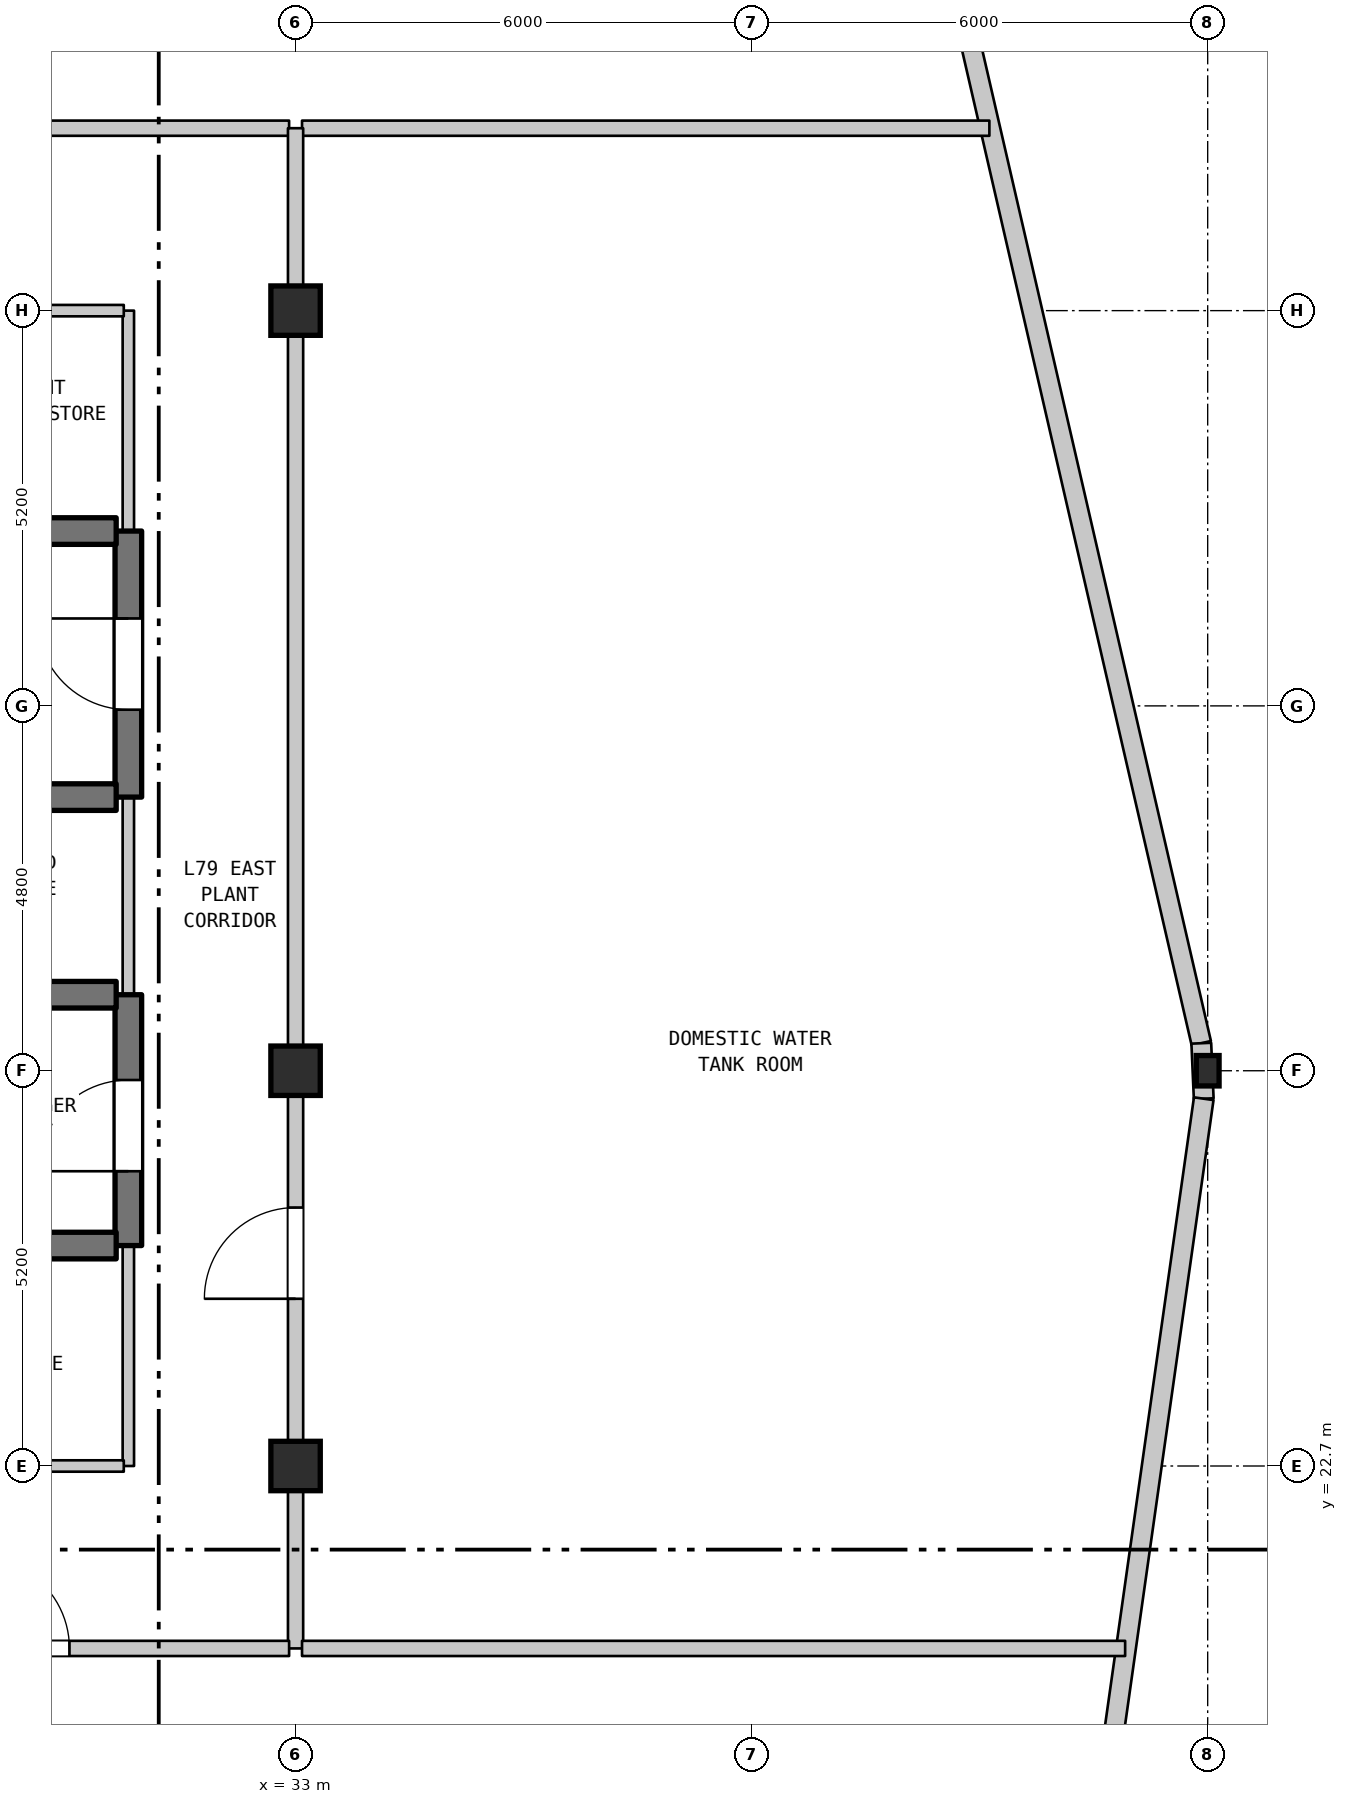
"""IFC4 building model, lengths in metres.
Left out: names, types, materials, properties, quantities, classifications, styles, units other than length and angle.
Written with IfcOpenShell. Run it as: python <this file> out.ifc"""

import sys

from ifc_helpers import new_model, si_unit, direction, frame, frame_2d, origin, origin_2d, place, context, subcontext, project, spatial, rectangle, i_section, extrude, element, fill, save


model = new_model("IFC4")
c1 = context("Model", 3, precision=1e-05, world=origin(), true_north=direction((0.0, 1.0)))
c2 = subcontext(c1, "Body", "Model", "MODEL_VIEW")
j1 = project(units=[si_unit("LENGTHUNIT", "METRE"), si_unit("PLANEANGLEUNIT", "RADIAN")], contexts=[c1])
p1 = place(None, origin())
s1 = spatial("IfcSite", under=j1, at=p1, CompositionType="ELEMENT")
p2 = place(p1, origin())
s2 = spatial("IfcBuilding", under=s1, at=p2, CompositionType="ELEMENT")
p3 = place(p2, frame((0.0, 0.0, 314.7)))
s3 = spatial("IfcBuildingStorey", under=s2, at=p3, CompositionType="ELEMENT", Elevation=314.7)
for number, where, z_axis, x_axis in (
    (1, (33.0, 22.7, 0.0), (0.0, 0.0, 1.0), (1.0, 0.0, 0.0)),
    (2, (33.0, 27.9, 0.0), (0.0, 0.0, 1.0), (1.0, 0.0, 0.0)),
    (3, (33.0, 37.9, 0.0), (0.0, 0.0, 1.0), (1.0, 0.0, 0.0)),
):
    element("IfcColumn", number, at=place(p3, frame(where, z_axis=z_axis, x_axis=x_axis)), inside=s3, PredefinedType="COLUMN", context=c2, shape_type="SweptSolid", body=[
        extrude(rectangle(XDim=0.65, YDim=0.65, at=origin_2d()), origin(), (0.0, 0.0, 1.0), 5.3),
    ])
p4 = place(p3, frame((45.0, 27.9, 0.0), z_axis=(0.0, 0.0, 1.0), x_axis=(1.0, 0.0, 0.0)))
e4 = element("IfcColumn", 4, at=p4, inside=s3, PredefinedType="COLUMN", context=c2, shape_type="SweptSolid", body=[
    extrude(i_section(OverallWidth=0.3, OverallDepth=0.4, WebThickness=0.013, FlangeThickness=0.024, FilletRadius=0.027, at=origin_2d()), origin(), (0.0, 0.0, 1.0), 5.3),
])
p5 = place(p3, frame((39.358, 52.35, 0.0), z_axis=(0.0, 0.0, 1.0), x_axis=(0.224832819719, -0.974397353843, 0.0)))
e5 = element("IfcWall", 5, at=p5, inside=s3, PredefinedType="STANDARD", context=c2, shape_type="SweptSolid", body=[
    extrude(rectangle(XDim=24.721, YDim=0.26, at=frame_2d((12.36, 0.0))), origin(), (0.0, 0.0, 1.0), 4.99),
])
p6 = place(p3, frame((44.916, 28.262, 0.0), z_axis=(0.0, 0.0, 1.0), x_axis=(0.043770719053, -0.999041602814, 0.0)))
e6 = element("IfcWall", 6, at=p6, inside=s3, PredefinedType="STANDARD", context=c2, shape_type="SweptSolid", body=[
    extrude(rectangle(XDim=0.731, YDim=0.26, at=frame_2d((0.365, 0.0))), origin(), (0.0, 0.0, 1.0), 4.99),
])
p7 = place(p3, frame((44.948, 27.532, 0.0), z_axis=(0.0, 0.0, 1.0), x_axis=(-0.140140996848, -0.990131557422, 0.0)))
e7 = element("IfcWall", 7, at=p7, inside=s3, PredefinedType="STANDARD", context=c2, shape_type="SweptSolid", body=[
    extrude(rectangle(XDim=19.302, YDim=0.26, at=frame_2d((9.651, 0.0))), origin(), (0.0, 0.0, 1.0), 4.99),
])
p8 = place(p3, frame((30.8, 22.7, 0.0), z_axis=(0.0, 0.0, 1.0), x_axis=(0.0, 1.0, 0.0)))
e8 = element("IfcWall", 8, at=p8, inside=s3, PredefinedType="STANDARD", context=c2, shape_type="SweptSolid", body=[
    extrude(rectangle(XDim=2.9, YDim=0.15, at=frame_2d((1.45, 0.0))), origin(), (0.0, 0.0, 1.0), 4.99),
])
p9 = place(p3, frame((30.8, 25.6, 0.0), z_axis=(0.0, 0.0, 1.0), x_axis=(0.0, 1.0, 0.0)))
e9 = element("IfcWall", 9, at=p9, inside=s3, PredefinedType="SHEAR", context=c2, shape_type="SweptSolid", body=[
    extrude(rectangle(XDim=3.3, YDim=0.35, at=frame_2d((1.65, 0.0))), origin(), (0.0, 0.0, 1.0), 4.99),
])
p10 = place(p9, frame((0.978, 0.0, 0.0)))
e10 = element("IfcOpeningElement", 10, at=p10, cuts=e9, PredefinedType="OPENING", context=c2, shape_type="SweptSolid", body=[
    extrude(rectangle(XDim=1.2, YDim=2.2, at=frame_2d((0.6, 1.1))), frame((0.0, 0.185, 0.0), z_axis=(0.0, -1.0, 0.0), x_axis=(1.0, 0.0, 0.0)), (0.0, 0.0, 1.0), 0.37),
])
p11 = place(p3, frame((30.8, 28.9, 0.0), z_axis=(0.0, 0.0, 1.0), x_axis=(0.0, 1.0, 0.0)))
e11 = element("IfcWall", 11, at=p11, inside=s3, PredefinedType="STANDARD", context=c2, shape_type="SweptSolid", body=[
    extrude(rectangle(XDim=2.6, YDim=0.15, at=frame_2d((1.3, 0.0))), origin(), (0.0, 0.0, 1.0), 4.99),
])
p12 = place(p3, frame((30.8, 31.5, 0.0), z_axis=(0.0, 0.0, 1.0), x_axis=(0.0, 1.0, 0.0)))
e12 = element("IfcWall", 12, at=p12, inside=s3, PredefinedType="SHEAR", context=c2, shape_type="SweptSolid", body=[
    extrude(rectangle(XDim=3.5, YDim=0.35, at=frame_2d((1.75, 0.0))), origin(), (0.0, 0.0, 1.0), 4.99),
])
p13 = place(p12, frame((1.15, 0.0, 0.0)))
e13 = element("IfcOpeningElement", 13, at=p13, cuts=e12, PredefinedType="OPENING", context=c2, shape_type="SweptSolid", body=[
    extrude(rectangle(XDim=1.2, YDim=2.2, at=frame_2d((0.6, 1.1))), frame((0.0, 0.185, 0.0), z_axis=(0.0, -1.0, 0.0), x_axis=(1.0, 0.0, 0.0)), (0.0, 0.0, 1.0), 0.37),
])
p14 = place(p3, frame((30.8, 35.0, 0.0), z_axis=(0.0, 0.0, 1.0), x_axis=(0.0, 1.0, 0.0)))
e14 = element("IfcWall", 14, at=p14, inside=s3, PredefinedType="STANDARD", context=c2, shape_type="SweptSolid", body=[
    extrude(rectangle(XDim=2.9, YDim=0.15, at=frame_2d((1.45, 0.0))), origin(), (0.0, 0.0, 1.0), 4.99),
])
p15 = place(p3, frame((33.0, 20.3, 0.0), z_axis=(0.0, 0.0, 1.0), x_axis=(0.0, 1.0, 0.0)))
e15 = element("IfcWall", 15, at=p15, inside=s3, PredefinedType="STANDARD", context=c2, shape_type="SweptSolid", body=[
    extrude(rectangle(XDim=7.6, YDim=0.2, at=frame_2d((3.8, 0.0))), origin(), (0.0, 0.0, 1.0), 4.7),
])
p16 = place(p15, frame((4.6, 0.0, 0.0)))
e16 = element("IfcOpeningElement", 16, at=p16, cuts=e15, PredefinedType="OPENING", context=c2, shape_type="SweptSolid", body=[
    extrude(rectangle(XDim=1.2, YDim=2.2, at=frame_2d((0.6, 1.1))), frame((0.0, 0.11, 0.0), z_axis=(0.0, -1.0, 0.0), x_axis=(1.0, 0.0, 0.0)), (0.0, 0.0, 1.0), 0.22),
])
p17 = place(p3, frame((12.685, 20.3, 0.0), z_axis=(0.0, 0.0, 1.0), x_axis=(1.0, 0.0, 0.0)))
e17 = element("IfcWall", 17, at=p17, inside=s3, PredefinedType="STANDARD", context=c2, shape_type="SweptSolid", body=[
    extrude(rectangle(XDim=20.23, YDim=0.2, at=frame_2d((10.115, 0.0))), origin(), (0.0, 0.0, 1.0), 4.99),
])
p18 = place(p17, frame((6.715, 0.0, 0.0)))
e18 = element("IfcOpeningElement", 18, at=p18, cuts=e17, PredefinedType="OPENING", context=c2, shape_type="SweptSolid", body=[
    extrude(rectangle(XDim=1.2, YDim=2.2, at=frame_2d((0.6, 1.1))), frame((0.0, 0.11, 0.0), z_axis=(0.0, -1.0, 0.0), x_axis=(1.0, 0.0, 0.0)), (0.0, 0.0, 1.0), 0.22),
])
p19 = place(p17, frame((16.14, 0.0, 0.0)))
e19 = element("IfcOpeningElement", 19, at=p19, cuts=e17, PredefinedType="OPENING", context=c2, shape_type="SweptSolid", body=[
    extrude(rectangle(XDim=1.2, YDim=2.2, at=frame_2d((0.6, 1.1))), frame((0.0, 0.11, 0.0), z_axis=(0.0, -1.0, 0.0), x_axis=(1.0, 0.0, 0.0)), (0.0, 0.0, 1.0), 0.22),
])
p20 = place(p3, frame((33.085, 20.3, 0.0), z_axis=(0.0, 0.0, 1.0), x_axis=(1.0, 0.0, 0.0)))
e20 = element("IfcWall", 20, at=p20, inside=s3, PredefinedType="STANDARD", context=c2, shape_type="SweptSolid", body=[
    extrude(rectangle(XDim=10.829, YDim=0.2, at=frame_2d((5.415, 0.0))), origin(), (0.0, 0.0, 1.0), 4.99),
])
p21 = place(p3, frame((27.46, 22.7, 0.0), z_axis=(0.0, 0.0, 1.0), x_axis=(1.0, 0.0, 0.0)))
e21 = element("IfcWall", 21, at=p21, inside=s3, PredefinedType="STANDARD", context=c2, shape_type="SweptSolid", body=[
    extrude(rectangle(XDim=3.28, YDim=0.15, at=frame_2d((1.64, 0.0))), origin(), (0.0, 0.0, 1.0), 4.99),
])
p22 = place(p3, frame((27.46, 25.6, 0.0), z_axis=(0.0, 0.0, 1.0), x_axis=(1.0, 0.0, 0.0)))
e22 = element("IfcWall", 22, at=p22, inside=s3, PredefinedType="SHEAR", context=c2, shape_type="SweptSolid", body=[
    extrude(rectangle(XDim=3.18, YDim=0.35, at=frame_2d((1.59, 0.0))), origin(), (0.0, 0.0, 1.0), 4.99),
])
p23 = place(p22, frame((1.115, 0.0, 0.0)))
e23 = element("IfcOpeningElement", 23, at=p23, cuts=e22, PredefinedType="OPENING", context=c2, shape_type="SweptSolid", body=[
    extrude(rectangle(XDim=0.95, YDim=2.15, at=frame_2d((0.475, 1.075))), frame((0.0, 0.185, 0.0), z_axis=(0.0, -1.0, 0.0), x_axis=(1.0, 0.0, 0.0)), (0.0, 0.0, 1.0), 0.37),
])
p24 = place(p3, frame((27.46, 28.9, 0.0), z_axis=(0.0, 0.0, 1.0), x_axis=(1.0, 0.0, 0.0)))
e24 = element("IfcWall", 24, at=p24, inside=s3, PredefinedType="SHEAR", context=c2, shape_type="SweptSolid", body=[
    extrude(rectangle(XDim=3.18, YDim=0.35, at=frame_2d((1.59, 0.0))), origin(), (0.0, 0.0, 1.0), 4.99),
])
p25 = place(p24, frame((1.115, 0.0, 0.0)))
e25 = element("IfcOpeningElement", 25, at=p25, cuts=e24, PredefinedType="OPENING", context=c2, shape_type="SweptSolid", body=[
    extrude(rectangle(XDim=0.95, YDim=2.15, at=frame_2d((0.475, 1.075))), frame((0.0, 0.185, 0.0), z_axis=(0.0, -1.0, 0.0), x_axis=(1.0, 0.0, 0.0)), (0.0, 0.0, 1.0), 0.37),
])
p26 = place(p3, frame((27.46, 31.5, 0.0), z_axis=(0.0, 0.0, 1.0), x_axis=(1.0, 0.0, 0.0)))
e26 = element("IfcWall", 26, at=p26, inside=s3, PredefinedType="SHEAR", context=c2, shape_type="SweptSolid", body=[
    extrude(rectangle(XDim=3.18, YDim=0.35, at=frame_2d((1.59, 0.0))), origin(), (0.0, 0.0, 1.0), 4.99),
])
p27 = place(p3, frame((26.645, 35.0, 0.0), z_axis=(0.0, 0.0, 1.0), x_axis=(1.0, 0.0, 0.0)))
e27 = element("IfcWall", 27, at=p27, inside=s3, PredefinedType="SHEAR", context=c2, shape_type="SweptSolid", body=[
    extrude(rectangle(XDim=3.995, YDim=0.35, at=frame_2d((1.998, 0.0))), origin(), (0.0, 0.0, 1.0), 4.99),
])
p28 = place(p27, frame((1.508, 0.0, 0.0)))
e28 = element("IfcOpeningElement", 28, at=p28, cuts=e27, PredefinedType="OPENING", context=c2, shape_type="SweptSolid", body=[
    extrude(rectangle(XDim=0.95, YDim=2.15, at=frame_2d((0.475, 1.075))), frame((0.0, 0.185, 0.0), z_axis=(0.0, -1.0, 0.0), x_axis=(1.0, 0.0, 0.0)), (0.0, 0.0, 1.0), 0.37),
])
p29 = place(p3, frame((26.645, 37.9, 0.0), z_axis=(0.0, 0.0, 1.0), x_axis=(1.0, 0.0, 0.0)))
e29 = element("IfcWall", 29, at=p29, inside=s3, PredefinedType="STANDARD", context=c2, shape_type="SweptSolid", body=[
    extrude(rectangle(XDim=4.095, YDim=0.15, at=frame_2d((2.047, 0.0))), origin(), (0.0, 0.0, 1.0), 4.49),
])
p30 = place(p3, frame((12.685, 40.3, 0.0), z_axis=(0.0, 0.0, 1.0), x_axis=(1.0, 0.0, 0.0)))
e30 = element("IfcWall", 30, at=p30, inside=s3, PredefinedType="STANDARD", context=c2, shape_type="SweptSolid", body=[
    extrude(rectangle(XDim=20.23, YDim=0.2, at=frame_2d((10.115, 0.0))), origin(), (0.0, 0.0, 1.0), 4.99),
])
p31 = place(p30, frame((12.14, 0.0, 0.0)))
e31 = element("IfcOpeningElement", 31, at=p31, cuts=e30, PredefinedType="OPENING", context=c2, shape_type="SweptSolid", body=[
    extrude(rectangle(XDim=1.2, YDim=2.2, at=frame_2d((0.6, 1.1))), frame((0.0, 0.11, 0.0), z_axis=(0.0, -1.0, 0.0), x_axis=(1.0, 0.0, 0.0)), (0.0, 0.0, 1.0), 0.22),
])
p32 = place(p3, frame((33.085, 40.3, 0.0), z_axis=(0.0, 0.0, 1.0), x_axis=(1.0, 0.0, 0.0)))
e32 = element("IfcWall", 32, at=p32, inside=s3, PredefinedType="STANDARD", context=c2, shape_type="SweptSolid", body=[
    extrude(rectangle(XDim=9.043, YDim=0.2, at=frame_2d((4.521, 0.0))), origin(), (0.0, 0.0, 1.0), 4.99),
])
p33 = place(p3, frame((33.0, 27.9, 0.0), z_axis=(0.0, 0.0, 1.0), x_axis=(0.0, 1.0, 0.0)))
e33 = element("IfcWall", 33, at=p33, inside=s3, PredefinedType="STANDARD", context=c2, shape_type="SweptSolid", body=[
    extrude(rectangle(XDim=10.0, YDim=0.2, at=frame_2d((5.0, 0.0))), origin(), (0.0, 0.0, 1.0), 4.49),
])
p34 = place(p3, frame((33.0, 37.9, 0.0), z_axis=(0.0, 0.0, 1.0), x_axis=(0.0, 1.0, 0.0)))
e34 = element("IfcWall", 34, at=p34, inside=s3, PredefinedType="STANDARD", context=c2, shape_type="SweptSolid", body=[
    extrude(rectangle(XDim=2.4, YDim=0.2, at=frame_2d((1.2, 0.0))), origin(), (0.0, 0.0, 1.0), 4.39),
])
p35 = place(p10, origin())
e35 = element("IfcDoor", 35, at=p35, inside=s3, OperationType="SINGLE_SWING_LEFT", PredefinedType="DOOR", context=c2, shape_type="SweptSolid", body=[
    extrude(rectangle(XDim=1.2, YDim=2.2, at=frame_2d((0.6, 1.1))), frame((0.0, 0.025, 0.0), z_axis=(0.0, -1.0, 0.0), x_axis=(1.0, 0.0, 0.0)), (0.0, 0.0, 1.0), 0.05),
])
fill(e10, e35)
p36 = place(p13, origin())
e36 = element("IfcDoor", 36, at=p36, inside=s3, OperationType="SINGLE_SWING_RIGHT", PredefinedType="DOOR", context=c2, shape_type="SweptSolid", body=[
    extrude(rectangle(XDim=1.2, YDim=2.2, at=frame_2d((0.6, 1.1))), frame((0.0, 0.025, 0.0), z_axis=(0.0, -1.0, 0.0), x_axis=(1.0, 0.0, 0.0)), (0.0, 0.0, 1.0), 0.05),
])
fill(e13, e36)
p37 = place(p16, origin())
e37 = element("IfcDoor", 37, at=p37, inside=s3, OperationType="SINGLE_SWING_LEFT", PredefinedType="DOOR", context=c2, shape_type="SweptSolid", body=[
    extrude(rectangle(XDim=1.2, YDim=2.2, at=frame_2d((0.6, 1.1))), frame((0.0, 0.025, 0.0), z_axis=(0.0, -1.0, 0.0), x_axis=(1.0, 0.0, 0.0)), (0.0, 0.0, 1.0), 0.05),
])
fill(e16, e37)
p38 = place(p19, origin())
e38 = element("IfcDoor", 38, at=p38, inside=s3, OperationType="SINGLE_SWING_LEFT", PredefinedType="DOOR", context=c2, shape_type="SweptSolid", body=[
    extrude(rectangle(XDim=1.2, YDim=2.2, at=frame_2d((0.6, 1.1))), frame((0.0, 0.025, 0.0), z_axis=(0.0, -1.0, 0.0), x_axis=(1.0, 0.0, 0.0)), (0.0, 0.0, 1.0), 0.05),
])
fill(e19, e38)
save(model, sys.argv[1])
